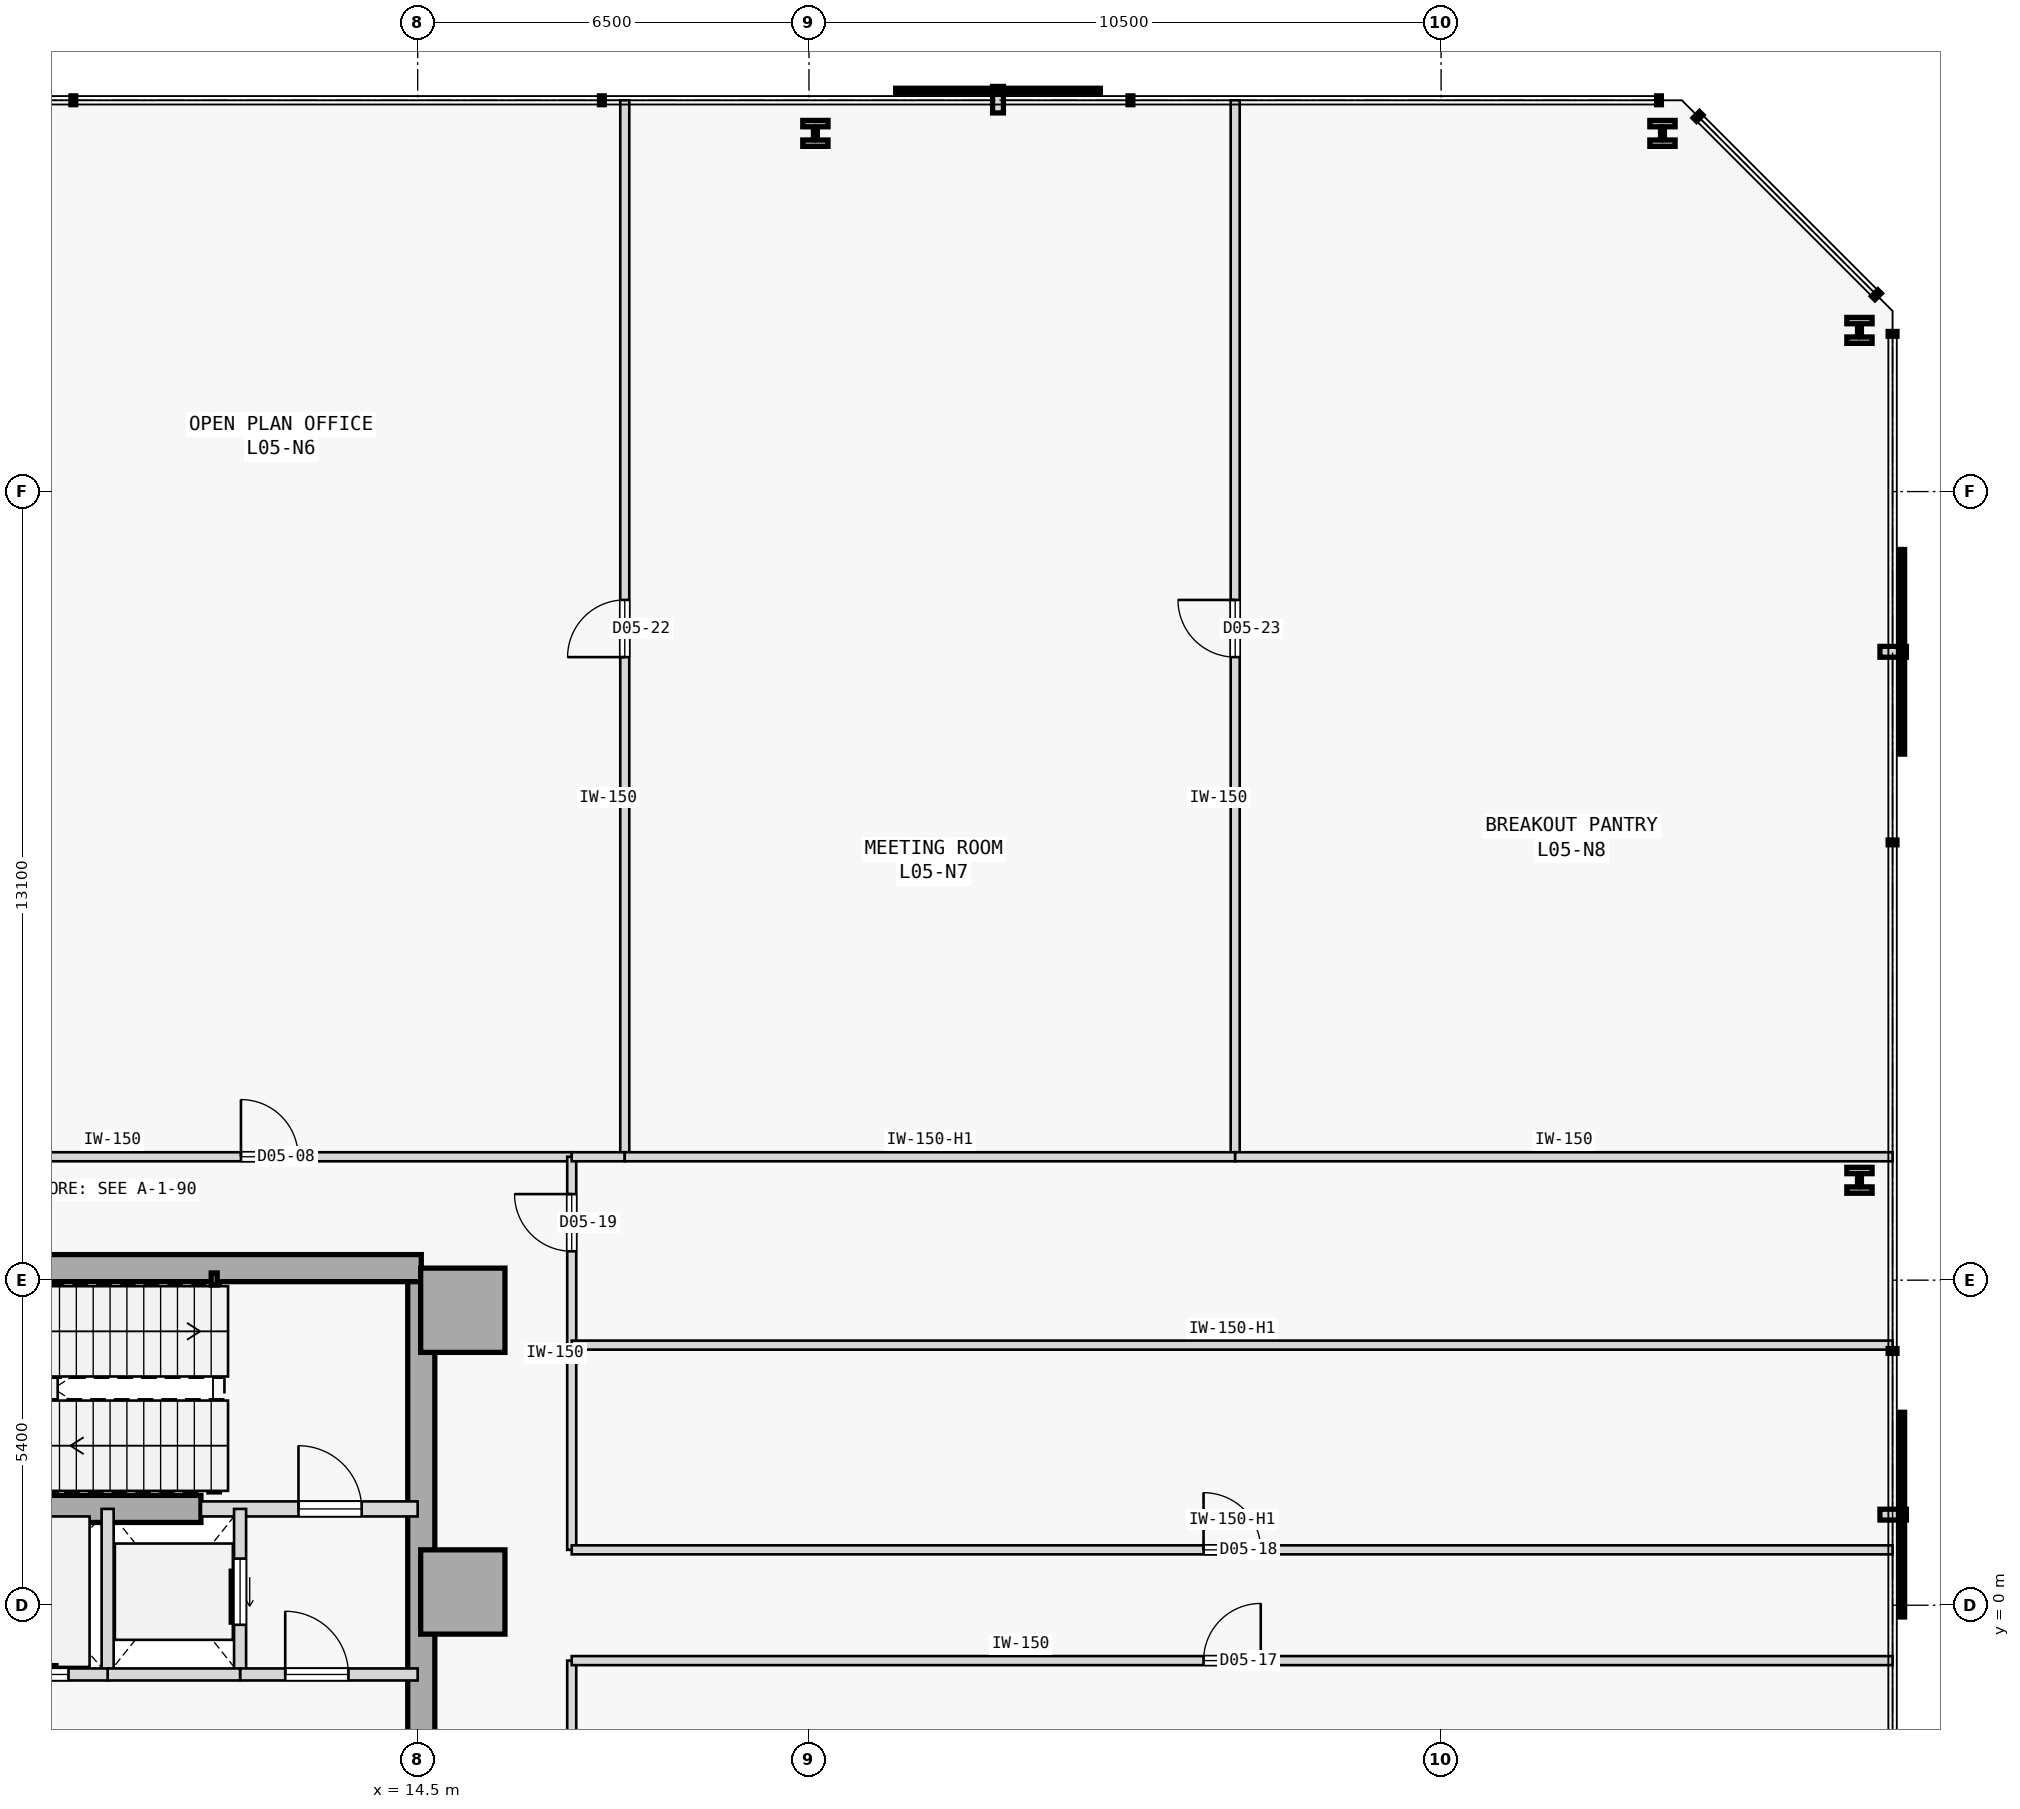
"""IFC4 building model, lengths in metres.
Left out: names, types, materials, properties, quantities, classifications, styles, units other than length and angle.
Written with IfcOpenShell. Run it as: python <this file> out.ifc"""

import sys

from ifc_helpers import new_model, si_unit, direction, frame, frame_2d, origin, origin_2d, place, context, subcontext, project, spatial, rectangle, hollow_rectangle, i_section, extrude, element, fill, save


model = new_model("IFC4")
c1 = context("Model", 3, precision=1e-05, world=origin(), true_north=direction((0.0, 1.0)))
c2 = subcontext(c1, "Body", "Model", "MODEL_VIEW")
j1 = project(units=[si_unit("LENGTHUNIT", "METRE"), si_unit("PLANEANGLEUNIT", "RADIAN")], contexts=[c1])
p1 = place(None, origin())
s1 = spatial("IfcSite", under=j1, at=p1, CompositionType="ELEMENT")
p2 = place(p1, origin())
s2 = spatial("IfcBuilding", under=s1, at=p2, CompositionType="ELEMENT")
p3 = place(p2, frame((0.0, 0.0, 25.6)))
s3 = spatial("IfcBuildingStorey", under=s2, at=p3, CompositionType="ELEMENT", Elevation=25.6)
for number, where, z_axis, x_axis in (
    (1, (15.25, 4.9, 0.0), (0.0, 0.0, 1.0), (1.0, 0.0, 0.0)),
    (2, (15.25, 0.22, 0.0), (0.0, 0.0, 1.0), (1.0, 0.0, 0.0)),
):
    element("IfcColumn", number, at=place(p3, frame(where, z_axis=z_axis, x_axis=x_axis)), inside=s3, PredefinedType="COLUMN", context=c2, shape_type="SweptSolid", body=[
        extrude(rectangle(XDim=1.4, YDim=1.4, at=origin_2d()), origin(), (0.0, 0.0, 1.0), 3.8),
    ])
p4 = place(p3, frame((3.15, 5.6, 0.0), z_axis=(0.0, 0.0, 1.0), x_axis=(1.0, 0.0, 0.0)))
e3 = element("IfcWall", 3, at=p4, inside=s3, PredefinedType="SHEAR", context=c2, shape_type="SweptSolid", body=[
    extrude(rectangle(XDim=11.41, YDim=0.45, at=frame_2d((5.705, 0.0))), origin(), (0.0, 0.0, 1.0), 3.575),
])
p5 = place(p3, frame((14.56, -5.375, 0.0), z_axis=(0.0, 0.0, 1.0), x_axis=(0.0, 1.0, 0.0)))
e4 = element("IfcWall", 4, at=p5, inside=s3, PredefinedType="SHEAR", context=c2, shape_type="SweptSolid", body=[
    extrude(rectangle(XDim=10.75, YDim=0.45, at=frame_2d((5.375, 0.0))), origin(), (0.0, 0.0, 1.0), 3.575),
])
p6 = place(p3, frame((5.75, 1.6, 0.0), z_axis=(0.0, 0.0, 1.0), x_axis=(1.0, 0.0, 0.0)))
e5 = element("IfcWall", 5, at=p6, inside=s3, PredefinedType="SHEAR", context=c2, shape_type="SweptSolid", body=[
    extrude(rectangle(XDim=5.15, YDim=0.45, at=frame_2d((2.575, 0.0))), origin(), (0.0, 0.0, 1.0), 3.575),
])
p7 = place(p3, frame((11.12, 5.42, 0.0), z_axis=(0.0, 0.0, 1.0), x_axis=(1.0, 0.0, 0.0)))
e6 = element("IfcColumn", 6, at=p7, inside=s3, PredefinedType="COLUMN", context=c2, shape_type="SweptSolid", body=[
    extrude(hollow_rectangle(XDim=0.1, YDim=0.2, WallThickness=0.008, at=origin_2d()), origin(), (0.0, 0.0, 1.0), 3.8),
])
for number, where, z_axis, x_axis in (
    (7, (38.45, 7.059, 0.0), (0.0, 0.0, 1.0), (1.0, 0.0, 0.0)),
    (8, (38.45, 21.178, 0.0), (0.0, 0.0, 1.0), (1.0, 0.0, 0.0)),
    (9, (35.178, 24.45, 0.0), (0.0, 0.0, 1.0), (1.0, 0.0, 0.0)),
    (10, (21.107, 24.45, 0.0), (0.0, 0.0, 1.0), (1.0, 0.0, 0.0)),
):
    element("IfcColumn", number, at=place(p3, frame(where, z_axis=z_axis, x_axis=x_axis)), inside=s3, PredefinedType="COLUMN", context=c2, shape_type="SweptSolid", body=[
        extrude(i_section(OverallWidth=0.42, OverallDepth=0.431, WebThickness=0.065, FlangeThickness=0.106, FilletRadius=0.015, at=origin_2d()), origin(), (0.0, 0.0, 1.0), 3.8),
    ])
p8 = place(p3, frame((10.9, 1.6, 0.0), z_axis=(0.0, 0.0, 1.0), x_axis=(1.0, 0.0, 0.0)))
e11 = element("IfcWall", 11, at=p8, inside=s3, PredefinedType="STANDARD", context=c2, shape_type="SweptSolid", body=[
    extrude(rectangle(XDim=3.6, YDim=0.25, at=frame_2d((1.8, 0.0))), origin(), (0.0, 0.0, 1.0), 3.575),
])
p9 = place(p8, frame((1.62, 0.0, 0.0)))
e12 = element("IfcOpeningElement", 12, at=p9, cuts=e11, PredefinedType="OPENING", context=c2, shape_type="SweptSolid", body=[
    extrude(rectangle(XDim=1.05, YDim=2.15, at=frame_2d((0.525, 1.075))), frame((0.0, 0.135, 0.0), z_axis=(0.0, -1.0, 0.0), x_axis=(1.0, 0.0, 0.0)), (0.0, 0.0, 1.0), 0.27),
])
p10 = place(p3, frame((11.55, -1.15, 0.0), z_axis=(0.0, 0.0, 1.0), x_axis=(0.0, 1.0, 0.0)))
e13 = element("IfcWall", 13, at=p10, inside=s3, PredefinedType="STANDARD", context=c2, shape_type="SweptSolid", body=[
    extrude(rectangle(XDim=2.75, YDim=0.2, at=frame_2d((1.375, 0.0))), origin(), (0.0, 0.0, 1.0), 3.575),
])
p11 = place(p10, frame((0.825, 0.0, 0.0)))
e14 = element("IfcOpeningElement", 14, at=p11, cuts=e13, PredefinedType="OPENING", context=c2, shape_type="SweptSolid", body=[
    extrude(rectangle(XDim=1.1, YDim=2.15, at=frame_2d((0.55, 1.075))), frame((0.0, 0.11, 0.0), z_axis=(0.0, -1.0, 0.0), x_axis=(1.0, 0.0, 0.0)), (0.0, 0.0, 1.0), 0.22),
])
p12 = place(p3, frame((9.35, -1.15, 0.0), z_axis=(0.0, 0.0, 1.0), x_axis=(0.0, 1.0, 0.0)))
e15 = element("IfcWall", 15, at=p12, inside=s3, PredefinedType="STANDARD", context=c2, shape_type="SweptSolid", body=[
    extrude(rectangle(XDim=2.75, YDim=0.2, at=frame_2d((1.375, 0.0))), origin(), (0.0, 0.0, 1.0), 3.575),
])
p13 = place(p3, frame((11.55, -1.15, 0.0), z_axis=(0.0, 0.0, 1.0), x_axis=(1.0, 0.0, 0.0)))
e16 = element("IfcWall", 16, at=p13, inside=s3, PredefinedType="STANDARD", context=c2, shape_type="SweptSolid", body=[
    extrude(rectangle(XDim=2.95, YDim=0.2, at=frame_2d((1.475, 0.0))), origin(), (0.0, 0.0, 1.0), 3.575),
])
p14 = place(p13, frame((0.75, 0.0, 0.0)))
e17 = element("IfcOpeningElement", 17, at=p14, cuts=e16, PredefinedType="OPENING", context=c2, shape_type="SweptSolid", body=[
    extrude(rectangle(XDim=1.05, YDim=2.18, at=frame_2d((0.525, 1.09))), frame((0.0, 0.11, 0.0), z_axis=(0.0, -1.0, 0.0), x_axis=(1.0, 0.0, 0.0)), (0.0, 0.0, 1.0), 0.22),
])
p15 = place(p3, frame((9.35, -1.15, 0.0), z_axis=(0.0, 0.0, 1.0), x_axis=(1.0, 0.0, 0.0)))
e18 = element("IfcWall", 18, at=p15, inside=s3, PredefinedType="STANDARD", context=c2, shape_type="SweptSolid", body=[
    extrude(rectangle(XDim=2.2, YDim=0.2, at=frame_2d((1.1, 0.0))), origin(), (0.0, 0.0, 1.0), 3.575),
])
p16 = place(p3, frame((6.95, -1.15, 0.0), z_axis=(0.0, 0.0, 1.0), x_axis=(1.0, 0.0, 0.0)))
e19 = element("IfcWall", 19, at=p16, inside=s3, PredefinedType="STANDARD", context=c2, shape_type="SweptSolid", body=[
    extrude(rectangle(XDim=2.4, YDim=0.2, at=frame_2d((1.2, 0.0))), origin(), (0.0, 0.0, 1.0), 3.575),
])
p17 = place(p16, frame((0.65, 0.0, 0.0)))
e20 = element("IfcOpeningElement", 20, at=p17, cuts=e19, PredefinedType="OPENING", context=c2, shape_type="SweptSolid", body=[
    extrude(rectangle(XDim=1.1, YDim=2.15, at=frame_2d((0.55, 1.075))), frame((0.0, 0.11, 0.0), z_axis=(0.0, -1.0, 0.0), x_axis=(1.0, 0.0, 0.0)), (0.0, 0.0, 1.0), 0.22),
])
p18 = place(p3, frame((7.02, 7.45, 0.0), z_axis=(0.0, 0.0, 1.0), x_axis=(1.0, 0.0, 0.0)))
e21 = element("IfcWall", 21, at=p18, inside=s3, PredefinedType="PARTITIONING", context=c2, shape_type="SweptSolid", body=[
    extrude(rectangle(XDim=10.039, YDim=0.15, at=frame_2d((5.02, 0.0))), origin(), (0.0, 0.0, 1.0), 3.575),
])
p19 = place(p18, frame((4.544, 0.0, 0.0)))
e22 = element("IfcOpeningElement", 22, at=p19, cuts=e21, PredefinedType="OPENING", context=c2, shape_type="SweptSolid", body=[
    extrude(rectangle(XDim=0.95, YDim=2.15, at=frame_2d((0.475, 1.075))), frame((0.0, 0.085, 0.0), z_axis=(0.0, -1.0, 0.0), x_axis=(1.0, 0.0, 0.0)), (0.0, 0.0, 1.0), 0.17),
])
p20 = place(p3, frame((17.059, -7.45, 0.0), z_axis=(0.0, 0.0, 1.0), x_axis=(0.0, 1.0, 0.0)))
e23 = element("IfcWall", 23, at=p20, inside=s3, PredefinedType="PARTITIONING", context=c2, shape_type="SweptSolid", body=[
    extrude(rectangle(XDim=6.53, YDim=0.15, at=frame_2d((3.265, 0.0))), origin(), (0.0, 0.0, 1.0), 3.575),
])
p21 = place(p3, frame((17.059, -0.92, 0.0), z_axis=(0.0, 0.0, 1.0), x_axis=(1.0, 0.0, 0.0)))
e24 = element("IfcWall", 24, at=p21, inside=s3, PredefinedType="PARTITIONING", context=c2, shape_type="SweptSolid", body=[
    extrude(rectangle(XDim=21.941, YDim=0.15, at=frame_2d((10.97, 0.0))), origin(), (0.0, 0.0, 1.0), 3.575),
])
p22 = place(p21, frame((10.496, 0.0, 0.0)))
e25 = element("IfcOpeningElement", 25, at=p22, cuts=e24, PredefinedType="OPENING", context=c2, shape_type="SweptSolid", body=[
    extrude(rectangle(XDim=0.95, YDim=2.15, at=frame_2d((0.475, 1.075))), frame((0.0, 0.085, 0.0), z_axis=(0.0, -1.0, 0.0), x_axis=(1.0, 0.0, 0.0)), (0.0, 0.0, 1.0), 0.17),
])
p23 = place(p3, frame((17.059, 0.92, 0.0), z_axis=(0.0, 0.0, 1.0), x_axis=(0.0, 1.0, 0.0)))
e26 = element("IfcWall", 26, at=p23, inside=s3, PredefinedType="PARTITIONING", context=c2, shape_type="SweptSolid", body=[
    extrude(rectangle(XDim=3.401, YDim=0.15, at=frame_2d((1.701, 0.0))), origin(), (0.0, 0.0, 1.0), 3.575),
])
p24 = place(p3, frame((17.059, 0.92, 0.0), z_axis=(0.0, 0.0, 1.0), x_axis=(1.0, 0.0, 0.0)))
e27 = element("IfcWall", 27, at=p24, inside=s3, PredefinedType="PARTITIONING", context=c2, shape_type="SweptSolid", body=[
    extrude(rectangle(XDim=21.941, YDim=0.15, at=frame_2d((10.97, 0.0))), origin(), (0.0, 0.0, 1.0), 3.125),
])
p25 = place(p24, frame((10.496, 0.0, 0.0)))
e28 = element("IfcOpeningElement", 28, at=p25, cuts=e27, PredefinedType="OPENING", context=c2, shape_type="SweptSolid", body=[
    extrude(rectangle(XDim=0.95, YDim=2.15, at=frame_2d((0.475, 1.075))), frame((0.0, 0.085, 0.0), z_axis=(0.0, -1.0, 0.0), x_axis=(1.0, 0.0, 0.0)), (0.0, 0.0, 1.0), 0.17),
])
p26 = place(p3, frame((17.059, 4.321, 0.0), z_axis=(0.0, 0.0, 1.0), x_axis=(0.0, 1.0, 0.0)))
e29 = element("IfcWall", 29, at=p26, inside=s3, PredefinedType="PARTITIONING", context=c2, shape_type="SweptSolid", body=[
    extrude(rectangle(XDim=3.129, YDim=0.15, at=frame_2d((1.564, 0.0))), origin(), (0.0, 0.0, 1.0), 3.575),
])
p27 = place(p26, frame((1.559, 0.0, 0.0)))
e30 = element("IfcOpeningElement", 30, at=p27, cuts=e29, PredefinedType="OPENING", context=c2, shape_type="SweptSolid", body=[
    extrude(rectangle(XDim=0.95, YDim=2.15, at=frame_2d((0.475, 1.075))), frame((0.0, 0.085, 0.0), z_axis=(0.0, -1.0, 0.0), x_axis=(1.0, 0.0, 0.0)), (0.0, 0.0, 1.0), 0.17),
])
p28 = place(p3, frame((17.94, 7.45, 0.0), z_axis=(0.0, 0.0, 1.0), x_axis=(0.0, 1.0, 0.0)))
e31 = element("IfcWall", 31, at=p28, inside=s3, PredefinedType="PARTITIONING", context=c2, shape_type="SweptSolid", body=[
    extrude(rectangle(XDim=17.55, YDim=0.15, at=frame_2d((8.775, 0.0))), origin(), (0.0, 0.0, 1.0), 3.575),
])
p29 = place(p28, frame((8.3, 0.0, 0.0)))
e32 = element("IfcOpeningElement", 32, at=p29, cuts=e31, PredefinedType="OPENING", context=c2, shape_type="SweptSolid", body=[
    extrude(rectangle(XDim=0.95, YDim=2.15, at=frame_2d((0.475, 1.075))), frame((0.0, 0.085, 0.0), z_axis=(0.0, -1.0, 0.0), x_axis=(1.0, 0.0, 0.0)), (0.0, 0.0, 1.0), 0.17),
])
p30 = place(p3, frame((17.059, 7.45, 0.0), z_axis=(0.0, 0.0, 1.0), x_axis=(1.0, 0.0, 0.0)))
e33 = element("IfcWall", 33, at=p30, inside=s3, PredefinedType="PARTITIONING", context=c2, shape_type="SweptSolid", body=[
    extrude(rectangle(XDim=0.881, YDim=0.15, at=frame_2d((0.44, 0.0))), origin(), (0.0, 0.0, 1.0), 3.575),
])
p31 = place(p3, frame((28.08, 7.45, 0.0), z_axis=(0.0, 0.0, 1.0), x_axis=(0.0, 1.0, 0.0)))
e34 = element("IfcWall", 34, at=p31, inside=s3, PredefinedType="PARTITIONING", context=c2, shape_type="SweptSolid", body=[
    extrude(rectangle(XDim=17.55, YDim=0.15, at=frame_2d((8.775, 0.0))), origin(), (0.0, 0.0, 1.0), 3.575),
])
p32 = place(p31, frame((8.3, 0.0, 0.0)))
e35 = element("IfcOpeningElement", 35, at=p32, cuts=e34, PredefinedType="OPENING", context=c2, shape_type="SweptSolid", body=[
    extrude(rectangle(XDim=0.95, YDim=2.15, at=frame_2d((0.475, 1.075))), frame((0.0, 0.085, 0.0), z_axis=(0.0, -1.0, 0.0), x_axis=(1.0, 0.0, 0.0)), (0.0, 0.0, 1.0), 0.17),
])
p33 = place(p3, frame((17.94, 7.45, 0.0), z_axis=(0.0, 0.0, 1.0), x_axis=(1.0, 0.0, 0.0)))
e36 = element("IfcWall", 36, at=p33, inside=s3, PredefinedType="PARTITIONING", context=c2, shape_type="SweptSolid", body=[
    extrude(rectangle(XDim=10.14, YDim=0.15, at=frame_2d((5.07, 0.0))), origin(), (0.0, 0.0, 1.0), 3.125),
])
p34 = place(p3, frame((28.08, 7.45, 0.0), z_axis=(0.0, 0.0, 1.0), x_axis=(1.0, 0.0, 0.0)))
e37 = element("IfcWall", 37, at=p34, inside=s3, PredefinedType="PARTITIONING", context=c2, shape_type="SweptSolid", body=[
    extrude(rectangle(XDim=10.92, YDim=0.15, at=frame_2d((5.46, 0.0))), origin(), (0.0, 0.0, 1.0), 3.575),
])
p35 = place(p3, frame((17.059, 4.321, 0.0), z_axis=(0.0, 0.0, 1.0), x_axis=(1.0, 0.0, 0.0)))
e38 = element("IfcWall", 38, at=p35, inside=s3, PredefinedType="PARTITIONING", context=c2, shape_type="SweptSolid", body=[
    extrude(rectangle(XDim=21.941, YDim=0.15, at=frame_2d((10.97, 0.0))), origin(), (0.0, 0.0, 1.0), 3.125),
])
p36 = place(p9, origin())
e39 = element("IfcDoor", 39, at=p36, inside=s3, OperationType="SINGLE_SWING_LEFT", PredefinedType="DOOR", context=c2, shape_type="SweptSolid", body=[
    extrude(rectangle(XDim=1.05, YDim=2.15, at=frame_2d((0.525, 1.075))), frame((0.0, 0.025, 0.0), z_axis=(0.0, -1.0, 0.0), x_axis=(1.0, 0.0, 0.0)), (0.0, 0.0, 1.0), 0.05),
])
fill(e12, e39)
p37 = place(p14, origin())
e40 = element("IfcDoor", 40, at=p37, inside=s3, OperationType="SINGLE_SWING_LEFT", PredefinedType="DOOR", context=c2, shape_type="SweptSolid", body=[
    extrude(rectangle(XDim=1.05, YDim=2.18, at=frame_2d((0.525, 1.09))), frame((0.0, 0.025, 0.0), z_axis=(0.0, -1.0, 0.0), x_axis=(1.0, 0.0, 0.0)), (0.0, 0.0, 1.0), 0.05),
])
fill(e17, e40)
p38 = place(p11, origin())
e41 = element("IfcDoor", 41, at=p38, inside=s3, OperationType="SLIDING_TO_RIGHT", PredefinedType="DOOR", context=c2, shape_type="SweptSolid", body=[
    extrude(rectangle(XDim=1.1, YDim=2.15, at=frame_2d((0.55, 1.075))), frame((0.0, 0.025, 0.0), z_axis=(0.0, -1.0, 0.0), x_axis=(1.0, 0.0, 0.0)), (0.0, 0.0, 1.0), 0.05),
])
fill(e14, e41)
p39 = place(p17, origin())
e42 = element("IfcDoor", 42, at=p39, inside=s3, OperationType="SLIDING_TO_RIGHT", PredefinedType="DOOR", context=c2, shape_type="SweptSolid", body=[
    extrude(rectangle(XDim=1.1, YDim=2.15, at=frame_2d((0.55, 1.075))), frame((0.0, 0.025, 0.0), z_axis=(0.0, -1.0, 0.0), x_axis=(1.0, 0.0, 0.0)), (0.0, 0.0, 1.0), 0.05),
])
fill(e20, e42)
p40 = place(p19, origin())
e43 = element("IfcDoor", 43, at=p40, inside=s3, OperationType="SINGLE_SWING_LEFT", PredefinedType="DOOR", context=c2, shape_type="SweptSolid", body=[
    extrude(rectangle(XDim=0.95, YDim=2.15, at=frame_2d((0.475, 1.075))), frame((0.0, 0.025, 0.0), z_axis=(0.0, -1.0, 0.0), x_axis=(1.0, 0.0, 0.0)), (0.0, 0.0, 1.0), 0.05),
])
fill(e22, e43)
p41 = place(p22, origin())
e44 = element("IfcDoor", 44, at=p41, inside=s3, OperationType="SINGLE_SWING_RIGHT", PredefinedType="DOOR", context=c2, shape_type="SweptSolid", body=[
    extrude(rectangle(XDim=0.95, YDim=2.15, at=frame_2d((0.475, 1.075))), frame((0.0, 0.025, 0.0), z_axis=(0.0, -1.0, 0.0), x_axis=(1.0, 0.0, 0.0)), (0.0, 0.0, 1.0), 0.05),
])
fill(e25, e44)
p42 = place(p25, origin())
e45 = element("IfcDoor", 45, at=p42, inside=s3, OperationType="SINGLE_SWING_LEFT", PredefinedType="DOOR", context=c2, shape_type="SweptSolid", body=[
    extrude(rectangle(XDim=0.95, YDim=2.15, at=frame_2d((0.475, 1.075))), frame((0.0, 0.025, 0.0), z_axis=(0.0, -1.0, 0.0), x_axis=(1.0, 0.0, 0.0)), (0.0, 0.0, 1.0), 0.05),
])
fill(e28, e45)
p43 = place(p27, origin())
e46 = element("IfcDoor", 46, at=p43, inside=s3, OperationType="SINGLE_SWING_RIGHT", PredefinedType="DOOR", context=c2, shape_type="SweptSolid", body=[
    extrude(rectangle(XDim=0.95, YDim=2.15, at=frame_2d((0.475, 1.075))), frame((0.0, 0.025, 0.0), z_axis=(0.0, -1.0, 0.0), x_axis=(1.0, 0.0, 0.0)), (0.0, 0.0, 1.0), 0.05),
])
fill(e30, e46)
p44 = place(p29, origin())
e47 = element("IfcDoor", 47, at=p44, inside=s3, OperationType="SINGLE_SWING_LEFT", PredefinedType="DOOR", context=c2, shape_type="SweptSolid", body=[
    extrude(rectangle(XDim=0.95, YDim=2.15, at=frame_2d((0.475, 1.075))), frame((0.0, 0.025, 0.0), z_axis=(0.0, -1.0, 0.0), x_axis=(1.0, 0.0, 0.0)), (0.0, 0.0, 1.0), 0.05),
])
fill(e32, e47)
p45 = place(p32, origin())
e48 = element("IfcDoor", 48, at=p45, inside=s3, OperationType="SINGLE_SWING_RIGHT", PredefinedType="DOOR", context=c2, shape_type="SweptSolid", body=[
    extrude(rectangle(XDim=0.95, YDim=2.15, at=frame_2d((0.475, 1.075))), frame((0.0, 0.025, 0.0), z_axis=(0.0, -1.0, 0.0), x_axis=(1.0, 0.0, 0.0)), (0.0, 0.0, 1.0), 0.05),
])
fill(e35, e48)
save(model, sys.argv[1])
